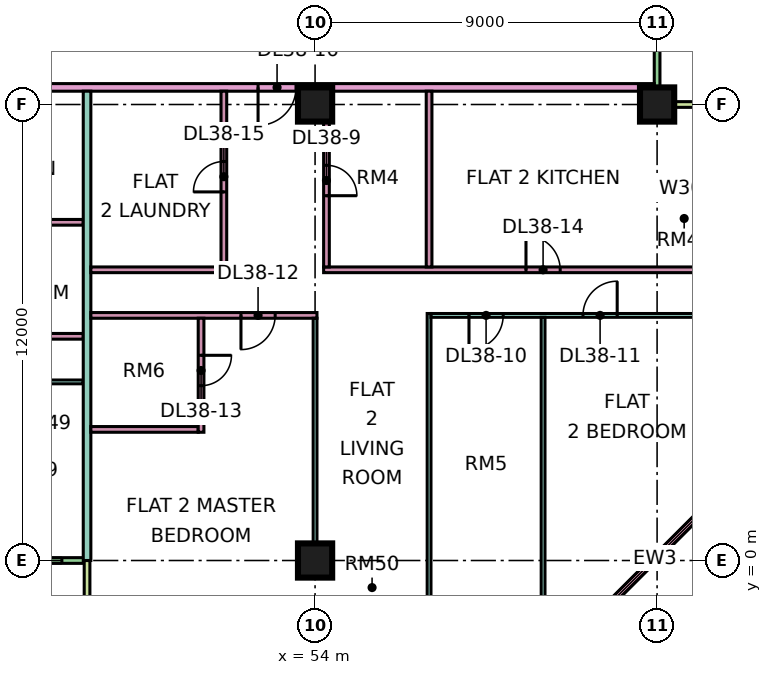
"""IFC4 building model, lengths in metres.
Left out: names, types, materials, properties, quantities, classifications, styles, units other than length and angle.
Written with IfcOpenShell. Run it as: python <this file> out.ifc"""

import sys

from ifc_helpers import new_model, si_unit, direction, frame, frame_2d, origin, origin_2d, place, context, subcontext, project, spatial, rectangle, extrude, element, fill, save


model = new_model("IFC4")
c1 = context("Model", 3, precision=1e-05, world=origin(), true_north=direction((0.0, 1.0)))
c2 = subcontext(c1, "Body", "Model", "MODEL_VIEW")
j1 = project(units=[si_unit("LENGTHUNIT", "METRE"), si_unit("PLANEANGLEUNIT", "RADIAN")], contexts=[c1])
p1 = place(None, origin())
s1 = spatial("IfcSite", under=j1, at=p1, CompositionType="ELEMENT")
p2 = place(p1, origin())
s2 = spatial("IfcBuilding", under=s1, at=p2, CompositionType="ELEMENT")
p3 = place(p2, frame((0.0, 0.0, 168.65)))
s3 = spatial("IfcBuildingStorey", under=s2, at=p3, CompositionType="ELEMENT", Elevation=168.65)
for number, where, z_axis, x_axis in (
    (1, (54.0, 0.0, 0.0), (0.0, 0.0, 1.0), (1.0, 0.0, 0.0)),
    (2, (54.0, 12.0, 0.0), (0.0, 0.0, 1.0), (1.0, 0.0, 0.0)),
    (3, (63.0, 12.0, 0.0), (0.0, 0.0, 1.0), (1.0, 0.0, 0.0)),
):
    element("IfcColumn", number, at=place(p3, frame(where, z_axis=z_axis, x_axis=x_axis)), inside=s3, PredefinedType="COLUMN", context=c2, shape_type="SweptSolid", body=[
        extrude(rectangle(XDim=0.9, YDim=0.9, at=origin_2d()), origin(), (0.0, 0.0, 1.0), 3.75),
    ])
p4 = place(p3, frame((36.075, 0.0, 0.0), z_axis=(0.0, 0.0, 1.0), x_axis=(1.0, 0.0, 0.0)))
e4 = element("IfcWall", 4, at=p4, inside=s3, PredefinedType="SOLIDWALL", context=c2, shape_type="SweptSolid", body=[
    extrude(rectangle(XDim=11.85, YDim=0.15, at=frame_2d((5.925, 0.0))), origin(), (0.0, 0.0, 1.0), 3.35),
])
p5 = place(p4, frame((3.525, 0.0, 0.0)))
e5 = element("IfcOpeningElement", 5, at=p5, cuts=e4, PredefinedType="OPENING", context=c2, shape_type="SweptSolid", body=[
    extrude(rectangle(XDim=1.8, YDim=2.4, at=frame_2d((0.9, 1.2))), frame((0.0, 0.085, 0.0), z_axis=(0.0, -1.0, 0.0), x_axis=(1.0, 0.0, 0.0)), (0.0, 0.0, 1.0), 0.17),
])
p6 = place(p4, frame((10.062, 0.0, 0.45)))
e6 = element("IfcOpeningElement", 6, at=p6, cuts=e4, PredefinedType="OPENING", context=c2, shape_type="SweptSolid", body=[
    extrude(rectangle(XDim=1.2, YDim=2.4, at=frame_2d((0.6, 1.2))), frame((0.0, 0.085, 0.0), z_axis=(0.0, -1.0, 0.0), x_axis=(1.0, 0.0, 0.0)), (0.0, 0.0, 1.0), 0.17),
])
p7 = place(p3, frame((48.0, -1.5, 0.0), z_axis=(0.0, 0.0, 1.0), x_axis=(0.0, 1.0, 0.0)))
e7 = element("IfcWall", 7, at=p7, inside=s3, PredefinedType="SOLIDWALL", context=c2, shape_type="SweptSolid", body=[
    extrude(rectangle(XDim=1.5, YDim=0.15, at=frame_2d((0.75, 0.0))), origin(), (0.0, 0.0, 1.0), 3.35),
])
p8 = place(p3, frame((61.447, -1.447, 0.0), z_axis=(0.0, 0.0, 1.0), x_axis=(0.707106781187, 0.707106781187, 0.0)))
e8 = element("IfcWall", 8, at=p8, inside=s3, PredefinedType="SOLIDWALL", context=c2, shape_type="SweptSolid", body=[
    extrude(rectangle(XDim=4.243, YDim=0.15, at=frame_2d((2.121, 0.0))), origin(), (0.0, 0.0, 1.0), 3.35),
])
p9 = place(p8, frame((0.621, 0.0, 0.45)))
e9 = element("IfcOpeningElement", 9, at=p9, cuts=e8, PredefinedType="OPENING", context=c2, shape_type="SweptSolid", body=[
    extrude(rectangle(XDim=3.0, YDim=2.4, at=frame_2d((1.5, 1.2))), frame((0.0, 0.085, 0.0), z_axis=(0.0, -1.0, 0.0), x_axis=(1.0, 0.0, 0.0)), (0.0, 0.0, 1.0), 0.17),
])
p10 = place(p3, frame((63.0, 12.075, 0.0), z_axis=(0.0, 0.0, 1.0), x_axis=(0.0, 1.0, 0.0)))
e10 = element("IfcWall", 10, at=p10, inside=s3, PredefinedType="SOLIDWALL", context=c2, shape_type="SweptSolid", body=[
    extrude(rectangle(XDim=10.35, YDim=0.15, at=frame_2d((5.175, 0.0))), origin(), (0.0, 0.0, 1.0), 3.35),
])
p11 = place(p10, frame((3.975, 0.0, 0.45)))
e11 = element("IfcOpeningElement", 11, at=p11, cuts=e10, PredefinedType="OPENING", context=c2, shape_type="SweptSolid", body=[
    extrude(rectangle(XDim=2.4, YDim=2.4, at=frame_2d((1.2, 1.2))), frame((0.0, 0.085, 0.0), z_axis=(0.0, -1.0, 0.0), x_axis=(1.0, 0.0, 0.0)), (0.0, 0.0, 1.0), 0.17),
])
p12 = place(p10, frame((8.587, 0.0, 0.45)))
e12 = element("IfcOpeningElement", 12, at=p12, cuts=e10, PredefinedType="OPENING", context=c2, shape_type="SweptSolid", body=[
    extrude(rectangle(XDim=1.2, YDim=2.4, at=frame_2d((0.6, 1.2))), frame((0.0, 0.085, 0.0), z_axis=(0.0, -1.0, 0.0), x_axis=(1.0, 0.0, 0.0)), (0.0, 0.0, 1.0), 0.17),
])
p13 = place(p3, frame((64.5, 12.0, 0.0), z_axis=(0.0, 0.0, 1.0), x_axis=(-1.0, 0.0, 0.0)))
e13 = element("IfcWall", 13, at=p13, inside=s3, PredefinedType="SOLIDWALL", context=c2, shape_type="SweptSolid", body=[
    extrude(rectangle(XDim=1.5, YDim=0.15, at=frame_2d((0.75, 0.0))), origin(), (0.0, 0.0, 1.0), 3.35),
])
p14 = place(p3, frame((33.05, 4.7, 0.0), z_axis=(0.0, 0.0, 1.0), x_axis=(1.0, 0.0, 0.0)))
e14 = element("IfcWall", 14, at=p14, inside=s3, PredefinedType="PARTITIONING", context=c2, shape_type="SweptSolid", body=[
    extrude(rectangle(XDim=14.85, YDim=0.1, at=frame_2d((7.425, 0.0))), origin(), (0.0, 0.0, 1.0), 3.35),
])
p15 = place(p14, frame((1.0, 0.0, 0.0)))
e15 = element("IfcOpeningElement", 15, at=p15, cuts=e14, PredefinedType="OPENING", context=c2, shape_type="SweptSolid", body=[
    extrude(rectangle(XDim=0.9, YDim=2.1, at=frame_2d((0.45, 1.05))), frame((0.0, 0.06, 0.0), z_axis=(0.0, -1.0, 0.0), x_axis=(1.0, 0.0, 0.0)), (0.0, 0.0, 1.0), 0.12),
])
p16 = place(p14, frame((13.0, 0.0, 0.0)))
e16 = element("IfcOpeningElement", 16, at=p16, cuts=e14, PredefinedType="OPENING", context=c2, shape_type="SweptSolid", body=[
    extrude(rectangle(XDim=0.9, YDim=2.1, at=frame_2d((0.45, 1.05))), frame((0.0, 0.06, 0.0), z_axis=(0.0, -1.0, 0.0), x_axis=(1.0, 0.0, 0.0)), (0.0, 0.0, 1.0), 0.12),
])
p17 = place(p14, frame((7.0, 0.0, 0.0)))
e17 = element("IfcOpeningElement", 17, at=p17, cuts=e14, PredefinedType="OPENING", context=c2, shape_type="SweptSolid", body=[
    extrude(rectangle(XDim=0.9, YDim=2.1, at=frame_2d((0.45, 1.05))), frame((0.0, 0.06, 0.0), z_axis=(0.0, -1.0, 0.0), x_axis=(1.0, 0.0, 0.0)), (0.0, 0.0, 1.0), 0.12),
])
p18 = place(p3, frame((40.65, 12.45, 0.0), z_axis=(0.0, 0.0, 1.0), x_axis=(1.0, 0.0, 0.0)))
e18 = element("IfcWall", 18, at=p18, inside=s3, PredefinedType="PARTITIONING", context=c2, shape_type="SweptSolid", body=[
    extrude(rectangle(XDim=22.276, YDim=0.2, at=frame_2d((11.138, 0.0))), origin(), (0.0, 0.0, 1.0), 3.35),
])
p19 = place(p18, frame((11.85, 0.0, 0.0)))
e19 = element("IfcOpeningElement", 19, at=p19, cuts=e18, PredefinedType="OPENING", context=c2, shape_type="SweptSolid", body=[
    extrude(rectangle(XDim=1.0, YDim=2.1, at=frame_2d((0.5, 1.05))), frame((0.0, 0.11, 0.0), z_axis=(0.0, -1.0, 0.0), x_axis=(1.0, 0.0, 0.0)), (0.0, 0.0, 1.0), 0.22),
])
p20 = place(p18, frame((1.05, 0.0, 0.0)))
e20 = element("IfcOpeningElement", 20, at=p20, cuts=e18, PredefinedType="OPENING", context=c2, shape_type="SweptSolid", body=[
    extrude(rectangle(XDim=1.0, YDim=2.1, at=frame_2d((0.5, 1.05))), frame((0.0, 0.11, 0.0), z_axis=(0.0, -1.0, 0.0), x_axis=(1.0, 0.0, 0.0)), (0.0, 0.0, 1.0), 0.22),
])
p21 = place(p3, frame((43.725, 5.9, 0.0), z_axis=(0.0, 0.0, 1.0), x_axis=(1.0, 0.0, 0.0)))
e21 = element("IfcWall", 21, at=p21, inside=s3, PredefinedType="PARTITIONING", context=c2, shape_type="SweptSolid", body=[
    extrude(rectangle(XDim=4.175, YDim=0.15, at=frame_2d((2.087, 0.0))), origin(), (0.0, 0.0, 1.0), 3.35),
])
p22 = place(p21, frame((1.675, 0.0, 0.0)))
e22 = element("IfcOpeningElement", 22, at=p22, cuts=e21, PredefinedType="OPENING", context=c2, shape_type="SweptSolid", body=[
    extrude(rectangle(XDim=0.8, YDim=2.1, at=frame_2d((0.4, 1.05))), frame((0.0, 0.085, 0.0), z_axis=(0.0, -1.0, 0.0), x_axis=(1.0, 0.0, 0.0)), (0.0, 0.0, 1.0), 0.17),
])
p23 = place(p3, frame((43.725, 8.9, 0.0), z_axis=(0.0, 0.0, 1.0), x_axis=(1.0, 0.0, 0.0)))
e23 = element("IfcWall", 23, at=p23, inside=s3, PredefinedType="PARTITIONING", context=c2, shape_type="SweptSolid", body=[
    extrude(rectangle(XDim=4.175, YDim=0.15, at=frame_2d((2.087, 0.0))), origin(), (0.0, 0.0, 1.0), 3.35),
])
p24 = place(p3, frame((48.0, 0.0, 0.0), z_axis=(0.0, 0.0, 1.0), x_axis=(0.0, 1.0, 0.0)))
e24 = element("IfcWall", 24, at=p24, inside=s3, PredefinedType="PARTITIONING", context=c2, shape_type="SweptSolid", body=[
    extrude(rectangle(XDim=12.35, YDim=0.2, at=frame_2d((6.175, 0.0))), origin(), (0.0, 0.0, 1.0), 3.35),
])
p25 = place(p3, frame((48.1, 3.45, 0.0), z_axis=(0.0, 0.0, 1.0), x_axis=(1.0, 0.0, 0.0)))
e25 = element("IfcWall", 25, at=p25, inside=s3, PredefinedType="PARTITIONING", context=c2, shape_type="SweptSolid", body=[
    extrude(rectangle(XDim=2.825, YDim=0.15, at=frame_2d((1.413, 0.0))), origin(), (0.0, 0.0, 1.0), 3.35),
])
p26 = place(p3, frame((48.1, 6.45, 0.0), z_axis=(0.0, 0.0, 1.0), x_axis=(1.0, 0.0, 0.0)))
e26 = element("IfcWall", 26, at=p26, inside=s3, PredefinedType="PARTITIONING", context=c2, shape_type="SweptSolid", body=[
    extrude(rectangle(XDim=5.95, YDim=0.15, at=frame_2d((2.975, 0.0))), origin(), (0.0, 0.0, 1.0), 3.35),
])
p27 = place(p26, frame((3.95, 0.0, 0.0)))
e27 = element("IfcOpeningElement", 27, at=p27, cuts=e26, PredefinedType="OPENING", context=c2, shape_type="SweptSolid", body=[
    extrude(rectangle(XDim=0.9, YDim=2.1, at=frame_2d((0.45, 1.05))), frame((0.0, 0.085, 0.0), z_axis=(0.0, -1.0, 0.0), x_axis=(1.0, 0.0, 0.0)), (0.0, 0.0, 1.0), 0.17),
])
p28 = place(p3, frame((48.1, 7.65, 0.0), z_axis=(0.0, 0.0, 1.0), x_axis=(1.0, 0.0, 0.0)))
e28 = element("IfcWall", 28, at=p28, inside=s3, PredefinedType="PARTITIONING", context=c2, shape_type="SweptSolid", body=[
    extrude(rectangle(XDim=3.425, YDim=0.15, at=frame_2d((1.712, 0.0))), origin(), (0.0, 0.0, 1.0), 3.35),
])
p29 = place(p3, frame((51.0, 3.375, 0.0), z_axis=(0.0, 0.0, 1.0), x_axis=(0.0, 1.0, 0.0)))
e29 = element("IfcWall", 29, at=p29, inside=s3, PredefinedType="PARTITIONING", context=c2, shape_type="SweptSolid", body=[
    extrude(rectangle(XDim=3.0, YDim=0.15, at=frame_2d((1.5, 0.0))), origin(), (0.0, 0.0, 1.0), 3.35),
])
p30 = place(p29, frame((1.225, 0.0, 0.0)))
e30 = element("IfcOpeningElement", 30, at=p30, cuts=e29, PredefinedType="OPENING", context=c2, shape_type="SweptSolid", body=[
    extrude(rectangle(XDim=0.8, YDim=2.1, at=frame_2d((0.4, 1.05))), frame((0.0, 0.085, 0.0), z_axis=(0.0, -1.0, 0.0), x_axis=(1.0, 0.0, 0.0)), (0.0, 0.0, 1.0), 0.17),
])
p31 = place(p3, frame((51.6, 7.575, 0.0), z_axis=(0.0, 0.0, 1.0), x_axis=(0.0, 1.0, 0.0)))
e31 = element("IfcWall", 31, at=p31, inside=s3, PredefinedType="PARTITIONING", context=c2, shape_type="SweptSolid", body=[
    extrude(rectangle(XDim=4.775, YDim=0.15, at=frame_2d((2.388, 0.0))), origin(), (0.0, 0.0, 1.0), 3.35),
])
p32 = place(p31, frame((2.125, 0.0, 0.0)))
e32 = element("IfcOpeningElement", 32, at=p32, cuts=e31, PredefinedType="OPENING", context=c2, shape_type="SweptSolid", body=[
    extrude(rectangle(XDim=0.8, YDim=2.1, at=frame_2d((0.4, 1.05))), frame((0.0, 0.085, 0.0), z_axis=(0.0, -1.0, 0.0), x_axis=(1.0, 0.0, 0.0)), (0.0, 0.0, 1.0), 0.17),
])
p33 = place(p3, frame((54.0, 0.0, 0.0), z_axis=(0.0, 0.0, 1.0), x_axis=(0.0, 1.0, 0.0)))
e33 = element("IfcWall", 33, at=p33, inside=s3, PredefinedType="PARTITIONING", context=c2, shape_type="SweptSolid", body=[
    extrude(rectangle(XDim=6.375, YDim=0.1, at=frame_2d((3.188, 0.0))), origin(), (0.0, 0.0, 1.0), 3.35),
])
p34 = place(p3, frame((54.225, 7.65, 0.0), z_axis=(0.0, 0.0, 1.0), x_axis=(1.0, 0.0, 0.0)))
e34 = element("IfcWall", 34, at=p34, inside=s3, PredefinedType="PARTITIONING", context=c2, shape_type="SweptSolid", body=[
    extrude(rectangle(XDim=10.125, YDim=0.15, at=frame_2d((5.062, 0.0))), origin(), (0.0, 0.0, 1.0), 3.35),
])
p35 = place(p34, frame((5.325, 0.0, 0.0)))
e35 = element("IfcOpeningElement", 35, at=p35, cuts=e34, PredefinedType="OPENING", context=c2, shape_type="SweptSolid", body=[
    extrude(rectangle(XDim=0.9, YDim=2.1, at=frame_2d((0.45, 1.05))), frame((0.0, 0.085, 0.0), z_axis=(0.0, -1.0, 0.0), x_axis=(1.0, 0.0, 0.0)), (0.0, 0.0, 1.0), 0.17),
])
p36 = place(p3, frame((54.3, 7.725, 0.0), z_axis=(0.0, 0.0, 1.0), x_axis=(0.0, 1.0, 0.0)))
e36 = element("IfcWall", 36, at=p36, inside=s3, PredefinedType="PARTITIONING", context=c2, shape_type="SweptSolid", body=[
    extrude(rectangle(XDim=4.625, YDim=0.15, at=frame_2d((2.312, 0.0))), origin(), (0.0, 0.0, 1.0), 3.35),
])
p37 = place(p36, frame((1.875, 0.0, 0.0)))
e37 = element("IfcOpeningElement", 37, at=p37, cuts=e36, PredefinedType="OPENING", context=c2, shape_type="SweptSolid", body=[
    extrude(rectangle(XDim=0.8, YDim=2.1, at=frame_2d((0.4, 1.05))), frame((0.0, 0.085, 0.0), z_axis=(0.0, -1.0, 0.0), x_axis=(1.0, 0.0, 0.0)), (0.0, 0.0, 1.0), 0.17),
])
p38 = place(p3, frame((57.0, -1.35, 0.0), z_axis=(0.0, 0.0, 1.0), x_axis=(0.0, 1.0, 0.0)))
e38 = element("IfcWall", 38, at=p38, inside=s3, PredefinedType="PARTITIONING", context=c2, shape_type="SweptSolid", body=[
    extrude(rectangle(XDim=7.85, YDim=0.1, at=frame_2d((3.925, 0.0))), origin(), (0.0, 0.0, 1.0), 3.35),
])
p39 = place(p3, frame((57.0, 7.725, 0.0), z_axis=(0.0, 0.0, 1.0), x_axis=(0.0, 1.0, 0.0)))
e39 = element("IfcWall", 39, at=p39, inside=s3, PredefinedType="PARTITIONING", context=c2, shape_type="SweptSolid", body=[
    extrude(rectangle(XDim=4.625, YDim=0.15, at=frame_2d((2.312, 0.0))), origin(), (0.0, 0.0, 1.0), 3.35),
])
p40 = place(p3, frame((57.05, 6.45, 0.0), z_axis=(0.0, 0.0, 1.0), x_axis=(1.0, 0.0, 0.0)))
e40 = element("IfcWall", 40, at=p40, inside=s3, PredefinedType="PARTITIONING", context=c2, shape_type="SweptSolid", body=[
    extrude(rectangle(XDim=7.3, YDim=0.1, at=frame_2d((3.65, 0.0))), origin(), (0.0, 0.0, 1.0), 3.35),
])
p41 = place(p40, frame((1.0, 0.0, 0.0)))
e41 = element("IfcOpeningElement", 41, at=p41, cuts=e40, PredefinedType="OPENING", context=c2, shape_type="SweptSolid", body=[
    extrude(rectangle(XDim=0.9, YDim=2.1, at=frame_2d((0.45, 1.05))), frame((0.0, 0.06, 0.0), z_axis=(0.0, -1.0, 0.0), x_axis=(1.0, 0.0, 0.0)), (0.0, 0.0, 1.0), 0.12),
])
p42 = place(p40, frame((4.0, 0.0, 0.0)))
e42 = element("IfcOpeningElement", 42, at=p42, cuts=e40, PredefinedType="OPENING", context=c2, shape_type="SweptSolid", body=[
    extrude(rectangle(XDim=0.9, YDim=2.1, at=frame_2d((0.45, 1.05))), frame((0.0, 0.06, 0.0), z_axis=(0.0, -1.0, 0.0), x_axis=(1.0, 0.0, 0.0)), (0.0, 0.0, 1.0), 0.12),
])
p43 = place(p3, frame((60.0, -1.351, 0.0), z_axis=(0.0, 0.0, 1.0), x_axis=(0.0, 1.0, 0.0)))
e43 = element("IfcWall", 43, at=p43, inside=s3, PredefinedType="PARTITIONING", context=c2, shape_type="SweptSolid", body=[
    extrude(rectangle(XDim=7.751, YDim=0.1, at=frame_2d((3.875, 0.0))), origin(), (0.0, 0.0, 1.0), 3.35),
])
p44 = place(p6, origin())
e44 = element("IfcWindow", 44, at=p44, inside=s3, PartitioningType="SINGLE_PANEL", PredefinedType="WINDOW", context=c2, shape_type="SweptSolid", body=[
    extrude(rectangle(XDim=1.2, YDim=2.4, at=frame_2d((0.6, 1.2))), frame((0.0, 0.03, 0.0), z_axis=(0.0, -1.0, 0.0), x_axis=(1.0, 0.0, 0.0)), (0.0, 0.0, 1.0), 0.06),
])
fill(e6, e44)
p45 = place(p9, origin())
e45 = element("IfcWindow", 45, at=p45, inside=s3, PartitioningType="SINGLE_PANEL", PredefinedType="WINDOW", context=c2, shape_type="SweptSolid", body=[
    extrude(rectangle(XDim=3.0, YDim=2.4, at=frame_2d((1.5, 1.2))), frame((0.0, 0.03, 0.0), z_axis=(0.0, -1.0, 0.0), x_axis=(1.0, 0.0, 0.0)), (0.0, 0.0, 1.0), 0.06),
])
fill(e9, e45)
p46 = place(p37, frame((0.8, 0.0, 0.0), z_axis=(0.0, 0.0, 1.0), x_axis=(-1.0, 0.0, 0.0)))
e46 = element("IfcDoor", 46, at=p46, inside=s3, OperationType="SINGLE_SWING_LEFT", PredefinedType="DOOR", context=c2, shape_type="SweptSolid", body=[
    extrude(rectangle(XDim=0.8, YDim=2.1, at=frame_2d((0.4, 1.05))), frame((0.0, 0.025, 0.0), z_axis=(0.0, -1.0, 0.0), x_axis=(1.0, 0.0, 0.0)), (0.0, 0.0, 1.0), 0.05),
])
fill(e37, e46)
p47 = place(p41, frame((0.9, 0.0, 0.0), z_axis=(0.0, 0.0, 1.0), x_axis=(-1.0, 0.0, 0.0)))
e47 = element("IfcDoor", 47, at=p47, inside=s3, OperationType="SINGLE_SWING_LEFT", PredefinedType="DOOR", context=c2, shape_type="SweptSolid", body=[
    extrude(rectangle(XDim=0.9, YDim=2.1, at=frame_2d((0.45, 1.05))), frame((0.0, 0.025, 0.0), z_axis=(0.0, -1.0, 0.0), x_axis=(1.0, 0.0, 0.0)), (0.0, 0.0, 1.0), 0.05),
])
fill(e41, e47)
p48 = place(p42, frame((0.9, 0.0, 0.0), z_axis=(0.0, 0.0, 1.0), x_axis=(-1.0, 0.0, 0.0)))
e48 = element("IfcDoor", 48, at=p48, inside=s3, OperationType="SINGLE_SWING_RIGHT", PredefinedType="DOOR", context=c2, shape_type="SweptSolid", body=[
    extrude(rectangle(XDim=0.9, YDim=2.1, at=frame_2d((0.45, 1.05))), frame((0.0, 0.025, 0.0), z_axis=(0.0, -1.0, 0.0), x_axis=(1.0, 0.0, 0.0)), (0.0, 0.0, 1.0), 0.05),
])
fill(e42, e48)
p49 = place(p27, frame((0.9, 0.0, 0.0), z_axis=(0.0, 0.0, 1.0), x_axis=(-1.0, 0.0, 0.0)))
e49 = element("IfcDoor", 49, at=p49, inside=s3, OperationType="SINGLE_SWING_LEFT", PredefinedType="DOOR", context=c2, shape_type="SweptSolid", body=[
    extrude(rectangle(XDim=0.9, YDim=2.1, at=frame_2d((0.45, 1.05))), frame((0.0, 0.025, 0.0), z_axis=(0.0, -1.0, 0.0), x_axis=(1.0, 0.0, 0.0)), (0.0, 0.0, 1.0), 0.05),
])
fill(e27, e49)
p50 = place(p30, origin())
e50 = element("IfcDoor", 50, at=p50, inside=s3, OperationType="SINGLE_SWING_RIGHT", PredefinedType="DOOR", context=c2, shape_type="SweptSolid", body=[
    extrude(rectangle(XDim=0.8, YDim=2.1, at=frame_2d((0.4, 1.05))), frame((0.0, 0.025, 0.0), z_axis=(0.0, -1.0, 0.0), x_axis=(1.0, 0.0, 0.0)), (0.0, 0.0, 1.0), 0.05),
])
fill(e30, e50)
p51 = place(p35, origin())
e51 = element("IfcDoor", 51, at=p51, inside=s3, OperationType="SINGLE_SWING_LEFT", PredefinedType="DOOR", context=c2, shape_type="SweptSolid", body=[
    extrude(rectangle(XDim=0.9, YDim=2.1, at=frame_2d((0.45, 1.05))), frame((0.0, 0.025, 0.0), z_axis=(0.0, -1.0, 0.0), x_axis=(1.0, 0.0, 0.0)), (0.0, 0.0, 1.0), 0.05),
])
fill(e35, e51)
p52 = place(p32, origin())
e52 = element("IfcDoor", 52, at=p52, inside=s3, OperationType="SINGLE_SWING_LEFT", PredefinedType="DOOR", context=c2, shape_type="SweptSolid", body=[
    extrude(rectangle(XDim=0.8, YDim=2.1, at=frame_2d((0.4, 1.05))), frame((0.0, 0.025, 0.0), z_axis=(0.0, -1.0, 0.0), x_axis=(1.0, 0.0, 0.0)), (0.0, 0.0, 1.0), 0.05),
])
fill(e32, e52)
p53 = place(p19, frame((1.0, 0.0, 0.0), z_axis=(0.0, 0.0, 1.0), x_axis=(-1.0, 0.0, 0.0)))
e53 = element("IfcDoor", 53, at=p53, inside=s3, OperationType="SINGLE_SWING_LEFT", PredefinedType="DOOR", context=c2, shape_type="SweptSolid", body=[
    extrude(rectangle(XDim=1.0, YDim=2.1, at=frame_2d((0.5, 1.05))), frame((0.0, 0.025, 0.0), z_axis=(0.0, -1.0, 0.0), x_axis=(1.0, 0.0, 0.0)), (0.0, 0.0, 1.0), 0.05),
])
fill(e19, e53)
save(model, sys.argv[1])
